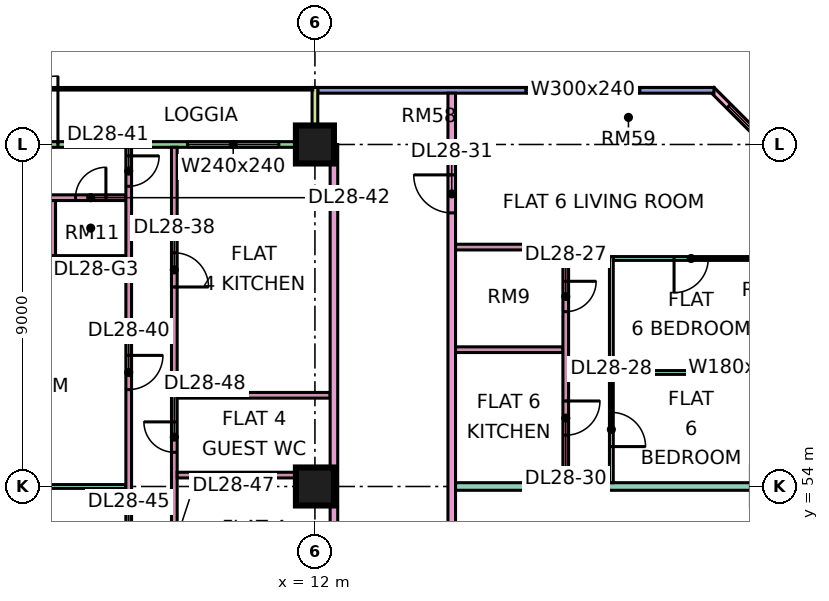
"""IFC4 building model, lengths in metres.
Left out: names, types, materials, properties, quantities, classifications, styles, units other than length and angle.
Written with IfcOpenShell. Run it as: python <this file> out.ifc"""

import sys

from ifc_helpers import new_model, si_unit, direction, frame, frame_2d, origin, origin_2d, place, context, subcontext, project, spatial, rectangle, extrude, element, fill, save


model = new_model("IFC4")
c1 = context("Model", 3, precision=1e-05, world=origin(), true_north=direction((0.0, 1.0)))
c2 = subcontext(c1, "Body", "Model", "MODEL_VIEW")
j1 = project(units=[si_unit("LENGTHUNIT", "METRE"), si_unit("PLANEANGLEUNIT", "RADIAN")], contexts=[c1])
p1 = place(None, origin())
s1 = spatial("IfcSite", under=j1, at=p1, CompositionType="ELEMENT")
p2 = place(p1, origin())
s2 = spatial("IfcBuilding", under=s1, at=p2, CompositionType="ELEMENT")
p3 = place(p2, frame((0.0, 0.0, 121.9)))
s3 = spatial("IfcBuildingStorey", under=s2, at=p3, CompositionType="ELEMENT", Elevation=121.9)
for number, where, z_axis, x_axis in (
    (1, (12.0, 54.0, 0.0), (0.0, 0.0, 1.0), (1.0, 0.0, 0.0)),
    (2, (12.0, 63.0, 0.0), (0.0, 0.0, 1.0), (1.0, 0.0, 0.0)),
):
    element("IfcColumn", number, at=place(p3, frame(where, z_axis=z_axis, x_axis=x_axis)), inside=s3, PredefinedType="COLUMN", context=c2, shape_type="SweptSolid", body=[
        extrude(rectangle(XDim=1.0, YDim=1.0, at=origin_2d()), origin(), (0.0, 0.0, 1.0), 3.75),
    ])
p4 = place(p3, frame((25.447, 61.447, 0.0), z_axis=(0.0, 0.0, 1.0), x_axis=(-0.707106781187, 0.707106781187, 0.0)))
e3 = element("IfcWall", 3, at=p4, inside=s3, PredefinedType="SOLIDWALL", context=c2, shape_type="SweptSolid", body=[
    extrude(rectangle(XDim=4.243, YDim=0.15, at=frame_2d((2.121, 0.0))), origin(), (0.0, 0.0, 1.0), 3.35),
])
p5 = place(p4, frame((0.621, 0.0, 0.45)))
e4 = element("IfcOpeningElement", 4, at=p5, cuts=e3, PredefinedType="OPENING", context=c2, shape_type="SweptSolid", body=[
    extrude(rectangle(XDim=3.0, YDim=2.4, at=frame_2d((1.5, 1.2))), frame((0.0, 0.085, 0.0), z_axis=(0.0, -1.0, 0.0), x_axis=(1.0, 0.0, 0.0)), (0.0, 0.0, 1.0), 0.17),
])
p6 = place(p3, frame((22.5, 64.425, 0.0), z_axis=(0.0, 0.0, 1.0), x_axis=(-1.0, 0.0, 0.0)))
e5 = element("IfcWall", 5, at=p6, inside=s3, PredefinedType="SOLIDWALL", context=c2, shape_type="SweptSolid", body=[
    extrude(rectangle(XDim=10.425, YDim=0.15, at=frame_2d((5.212, 0.0))), origin(), (0.0, 0.0, 1.0), 3.35),
])
p7 = place(p6, frame((1.95, 0.0, 0.45)))
e6 = element("IfcOpeningElement", 6, at=p7, cuts=e5, PredefinedType="OPENING", context=c2, shape_type="SweptSolid", body=[
    extrude(rectangle(XDim=3.0, YDim=2.4, at=frame_2d((1.5, 1.2))), frame((0.0, 0.085, 0.0), z_axis=(0.0, -1.0, 0.0), x_axis=(1.0, 0.0, 0.0)), (0.0, 0.0, 1.0), 0.17),
])
p8 = place(p3, frame((11.925, 63.0, 0.0), z_axis=(0.0, 0.0, 1.0), x_axis=(-1.0, 0.0, 0.0)))
e7 = element("IfcWall", 7, at=p8, inside=s3, PredefinedType="SOLIDWALL", context=c2, shape_type="SweptSolid", body=[
    extrude(rectangle(XDim=10.35, YDim=0.15, at=frame_2d((5.175, 0.0))), origin(), (0.0, 0.0, 1.0), 3.35),
])
p9 = place(p8, frame((0.875, 0.0, 0.45)))
e8 = element("IfcOpeningElement", 8, at=p9, cuts=e7, PredefinedType="OPENING", context=c2, shape_type="SweptSolid", body=[
    extrude(rectangle(XDim=2.4, YDim=2.4, at=frame_2d((1.2, 1.2))), frame((0.0, 0.085, 0.0), z_axis=(0.0, -1.0, 0.0), x_axis=(1.0, 0.0, 0.0)), (0.0, 0.0, 1.0), 0.17),
])
p10 = place(p8, frame((6.688, 0.0, 0.0)))
e9 = element("IfcOpeningElement", 9, at=p10, cuts=e7, PredefinedType="OPENING", context=c2, shape_type="SweptSolid", body=[
    extrude(rectangle(XDim=1.8, YDim=2.4, at=frame_2d((0.9, 1.2))), frame((0.0, 0.085, 0.0), z_axis=(0.0, -1.0, 0.0), x_axis=(1.0, 0.0, 0.0)), (0.0, 0.0, 1.0), 0.17),
])
p11 = place(p3, frame((12.0, 64.5, 0.0), z_axis=(0.0, 0.0, 1.0), x_axis=(0.0, -1.0, 0.0)))
e10 = element("IfcWall", 10, at=p11, inside=s3, PredefinedType="SOLIDWALL", context=c2, shape_type="SweptSolid", body=[
    extrude(rectangle(XDim=1.5, YDim=0.15, at=frame_2d((0.75, 0.0))), origin(), (0.0, 0.0, 1.0), 3.35),
])
p12 = place(p3, frame((0.074, 54.0, 0.0), z_axis=(0.0, 0.0, 1.0), x_axis=(1.0, 0.0, 0.0)))
e11 = element("IfcWall", 11, at=p12, inside=s3, PredefinedType="PARTITIONING", context=c2, shape_type="SweptSolid", body=[
    extrude(rectangle(XDim=6.951, YDim=0.1, at=frame_2d((3.476, 0.0))), origin(), (0.0, 0.0, 1.0), 3.35),
])
p13 = place(p3, frame((0.074, 60.0, 0.0), z_axis=(0.0, 0.0, 1.0), x_axis=(1.0, 0.0, 0.0)))
e12 = element("IfcWall", 12, at=p13, inside=s3, PredefinedType="PARTITIONING", context=c2, shape_type="SweptSolid", body=[
    extrude(rectangle(XDim=6.951, YDim=0.15, at=frame_2d((3.476, 0.0))), origin(), (0.0, 0.0, 1.0), 3.35),
])
p14 = place(p3, frame((5.025, 61.6, 0.0), z_axis=(0.0, 0.0, 1.0), x_axis=(1.0, 0.0, 0.0)))
e13 = element("IfcWall", 13, at=p14, inside=s3, PredefinedType="PARTITIONING", context=c2, shape_type="SweptSolid", body=[
    extrude(rectangle(XDim=2.0, YDim=0.15, at=frame_2d((1.0, 0.0))), origin(), (0.0, 0.0, 1.0), 3.35),
])
p15 = place(p14, frame((0.675, 0.0, 0.0)))
e14 = element("IfcOpeningElement", 14, at=p15, cuts=e13, PredefinedType="OPENING", context=c2, shape_type="SweptSolid", body=[
    extrude(rectangle(XDim=0.8, YDim=2.1, at=frame_2d((0.4, 1.05))), frame((0.0, 0.085, 0.0), z_axis=(0.0, -1.0, 0.0), x_axis=(1.0, 0.0, 0.0)), (0.0, 0.0, 1.0), 0.17),
])
p16 = place(p3, frame((5.1, 60.075, 0.0), z_axis=(0.0, 0.0, 1.0), x_axis=(0.0, 1.0, 0.0)))
e15 = element("IfcWall", 15, at=p16, inside=s3, PredefinedType="PARTITIONING", context=c2, shape_type="SweptSolid", body=[
    extrude(rectangle(XDim=1.45, YDim=0.15, at=frame_2d((0.725, 0.0))), origin(), (0.0, 0.0, 1.0), 3.35),
])
p17 = place(p3, frame((7.1, 36.1, 0.0), z_axis=(0.0, 0.0, 1.0), x_axis=(0.0, 1.0, 0.0)))
e16 = element("IfcWall", 16, at=p17, inside=s3, PredefinedType="PARTITIONING", context=c2, shape_type="SweptSolid", body=[
    extrude(rectangle(XDim=26.826, YDim=0.15, at=frame_2d((13.413, 0.0))), origin(), (0.0, 0.0, 1.0), 3.35),
])
p18 = place(p17, frame((0.95, 0.0, 0.0)))
e17 = element("IfcOpeningElement", 17, at=p18, cuts=e16, PredefinedType="OPENING", context=c2, shape_type="SweptSolid", body=[
    extrude(rectangle(XDim=0.9, YDim=2.1, at=frame_2d((0.45, 1.05))), frame((0.0, 0.085, 0.0), z_axis=(0.0, -1.0, 0.0), x_axis=(1.0, 0.0, 0.0)), (0.0, 0.0, 1.0), 0.17),
])
p19 = place(p17, frame((9.95, 0.0, 0.0)))
e18 = element("IfcOpeningElement", 18, at=p19, cuts=e16, PredefinedType="OPENING", context=c2, shape_type="SweptSolid", body=[
    extrude(rectangle(XDim=0.9, YDim=2.1, at=frame_2d((0.45, 1.05))), frame((0.0, 0.085, 0.0), z_axis=(0.0, -1.0, 0.0), x_axis=(1.0, 0.0, 0.0)), (0.0, 0.0, 1.0), 0.17),
])
p20 = place(p17, frame((6.95, 0.0, 0.0)))
e19 = element("IfcOpeningElement", 19, at=p20, cuts=e16, PredefinedType="OPENING", context=c2, shape_type="SweptSolid", body=[
    extrude(rectangle(XDim=0.9, YDim=2.1, at=frame_2d((0.45, 1.05))), frame((0.0, 0.085, 0.0), z_axis=(0.0, -1.0, 0.0), x_axis=(1.0, 0.0, 0.0)), (0.0, 0.0, 1.0), 0.17),
])
p21 = place(p17, frame((20.45, 0.0, 0.0)))
e20 = element("IfcOpeningElement", 20, at=p21, cuts=e16, PredefinedType="OPENING", context=c2, shape_type="SweptSolid", body=[
    extrude(rectangle(XDim=0.9, YDim=2.1, at=frame_2d((0.45, 1.05))), frame((0.0, 0.085, 0.0), z_axis=(0.0, -1.0, 0.0), x_axis=(1.0, 0.0, 0.0)), (0.0, 0.0, 1.0), 0.17),
])
p22 = place(p17, frame((25.8, 0.0, 0.0)))
e21 = element("IfcOpeningElement", 21, at=p22, cuts=e16, PredefinedType="OPENING", context=c2, shape_type="SweptSolid", body=[
    extrude(rectangle(XDim=0.8, YDim=2.1, at=frame_2d((0.4, 1.05))), frame((0.0, 0.085, 0.0), z_axis=(0.0, -1.0, 0.0), x_axis=(1.0, 0.0, 0.0)), (0.0, 0.0, 1.0), 0.17),
])
p23 = place(p17, frame((12.55, 0.0, 0.0)))
e22 = element("IfcOpeningElement", 22, at=p23, cuts=e16, PredefinedType="OPENING", context=c2, shape_type="SweptSolid", body=[
    extrude(rectangle(XDim=1.6, YDim=2.1, at=frame_2d((0.8, 1.05))), frame((0.0, 0.085, 0.0), z_axis=(0.0, -1.0, 0.0), x_axis=(1.0, 0.0, 0.0)), (0.0, 0.0, 1.0), 0.17),
])
p24 = place(p17, frame((15.95, 0.0, 0.0)))
e23 = element("IfcOpeningElement", 23, at=p24, cuts=e16, PredefinedType="OPENING", context=c2, shape_type="SweptSolid", body=[
    extrude(rectangle(XDim=0.9, YDim=2.1, at=frame_2d((0.45, 1.05))), frame((0.0, 0.085, 0.0), z_axis=(0.0, -1.0, 0.0), x_axis=(1.0, 0.0, 0.0)), (0.0, 0.0, 1.0), 0.17),
])
p25 = place(p3, frame((8.3, 41.625, 0.0), z_axis=(0.0, 0.0, 1.0), x_axis=(0.0, 1.0, 0.0)))
e24 = element("IfcWall", 24, at=p25, inside=s3, PredefinedType="PARTITIONING", context=c2, shape_type="SweptSolid", body=[
    extrude(rectangle(XDim=21.301, YDim=0.15, at=frame_2d((10.65, 0.0))), origin(), (0.0, 0.0, 1.0), 3.35),
])
p26 = place(p25, frame((4.725, 0.0, 0.0)))
e25 = element("IfcOpeningElement", 25, at=p26, cuts=e24, PredefinedType="OPENING", context=c2, shape_type="SweptSolid", body=[
    extrude(rectangle(XDim=0.8, YDim=2.1, at=frame_2d((0.4, 1.05))), frame((0.0, 0.085, 0.0), z_axis=(0.0, -1.0, 0.0), x_axis=(1.0, 0.0, 0.0)), (0.0, 0.0, 1.0), 0.17),
])
p27 = place(p25, frame((17.625, 0.0, 0.0)))
e26 = element("IfcOpeningElement", 26, at=p27, cuts=e24, PredefinedType="OPENING", context=c2, shape_type="SweptSolid", body=[
    extrude(rectangle(XDim=0.9, YDim=2.1, at=frame_2d((0.45, 1.05))), frame((0.0, 0.085, 0.0), z_axis=(0.0, -1.0, 0.0), x_axis=(1.0, 0.0, 0.0)), (0.0, 0.0, 1.0), 0.17),
])
p28 = place(p25, frame((1.275, 0.0, 0.0)))
e27 = element("IfcOpeningElement", 27, at=p28, cuts=e24, PredefinedType="OPENING", context=c2, shape_type="SweptSolid", body=[
    extrude(rectangle(XDim=0.8, YDim=2.1, at=frame_2d((0.4, 1.05))), frame((0.0, 0.085, 0.0), z_axis=(0.0, -1.0, 0.0), x_axis=(1.0, 0.0, 0.0)), (0.0, 0.0, 1.0), 0.17),
])
p29 = place(p25, frame((7.575, 0.0, 0.0)))
e28 = element("IfcOpeningElement", 28, at=p29, cuts=e24, PredefinedType="OPENING", context=c2, shape_type="SweptSolid", body=[
    extrude(rectangle(XDim=0.8, YDim=2.1, at=frame_2d((0.4, 1.05))), frame((0.0, 0.085, 0.0), z_axis=(0.0, -1.0, 0.0), x_axis=(1.0, 0.0, 0.0)), (0.0, 0.0, 1.0), 0.17),
])
p30 = place(p25, frame((10.425, 0.0, 0.0)))
e29 = element("IfcOpeningElement", 29, at=p30, cuts=e24, PredefinedType="OPENING", context=c2, shape_type="SweptSolid", body=[
    extrude(rectangle(XDim=0.8, YDim=2.1, at=frame_2d((0.4, 1.05))), frame((0.0, 0.085, 0.0), z_axis=(0.0, -1.0, 0.0), x_axis=(1.0, 0.0, 0.0)), (0.0, 0.0, 1.0), 0.17),
])
p31 = place(p25, frame((13.275, 0.0, 0.0)))
e30 = element("IfcOpeningElement", 30, at=p31, cuts=e24, PredefinedType="OPENING", context=c2, shape_type="SweptSolid", body=[
    extrude(rectangle(XDim=0.8, YDim=2.1, at=frame_2d((0.4, 1.05))), frame((0.0, 0.085, 0.0), z_axis=(0.0, -1.0, 0.0), x_axis=(1.0, 0.0, 0.0)), (0.0, 0.0, 1.0), 0.17),
])
for number, where, z_axis, x_axis in (
    (31, (8.375, 54.3, 0.0), (0.0, 0.0, 1.0), (1.0, 0.0, 0.0)),
    (32, (8.375, 56.4, 0.0), (0.0, 0.0, 1.0), (1.0, 0.0, 0.0)),
):
    element("IfcWall", number, at=place(p3, frame(where, z_axis=z_axis, x_axis=x_axis)), inside=s3, PredefinedType="PARTITIONING", context=c2, shape_type="SweptSolid", body=[
        extrude(rectangle(XDim=4.025, YDim=0.15, at=frame_2d((2.012, 0.0))), origin(), (0.0, 0.0, 1.0), 3.35),
    ])
p32 = place(p3, frame((12.5, 20.0, 0.0), z_axis=(0.0, 0.0, 1.0), x_axis=(0.0, 1.0, 0.0)))
e33 = element("IfcWall", 33, at=p32, inside=s3, PredefinedType="PARTITIONING", context=c2, shape_type="SweptSolid", body=[
    extrude(rectangle(XDim=43.0, YDim=0.2, at=frame_2d((21.5, 0.0))), origin(), (0.0, 0.0, 1.0), 3.35),
])
p33 = place(p32, frame((19.65, 0.0, 0.0)))
e34 = element("IfcOpeningElement", 34, at=p33, cuts=e33, PredefinedType="OPENING", context=c2, shape_type="SweptSolid", body=[
    extrude(rectangle(XDim=1.0, YDim=2.1, at=frame_2d((0.5, 1.05))), frame((0.0, 0.11, 0.0), z_axis=(0.0, -1.0, 0.0), x_axis=(1.0, 0.0, 0.0)), (0.0, 0.0, 1.0), 0.22),
])
p34 = place(p32, frame((0.6, 0.0, 0.0)))
e35 = element("IfcOpeningElement", 35, at=p34, cuts=e33, PredefinedType="OPENING", context=c2, shape_type="SweptSolid", body=[
    extrude(rectangle(XDim=1.2, YDim=2.1, at=frame_2d((0.6, 1.05))), frame((0.0, 0.11, 0.0), z_axis=(0.0, -1.0, 0.0), x_axis=(1.0, 0.0, 0.0)), (0.0, 0.0, 1.0), 0.22),
])
p35 = place(p32, frame((4.5, 0.0, 0.0)))
e36 = element("IfcOpeningElement", 36, at=p35, cuts=e33, PredefinedType="OPENING", context=c2, shape_type="SweptSolid", body=[
    extrude(rectangle(XDim=1.0, YDim=2.1, at=frame_2d((0.5, 1.05))), frame((0.0, 0.11, 0.0), z_axis=(0.0, -1.0, 0.0), x_axis=(1.0, 0.0, 0.0)), (0.0, 0.0, 1.0), 0.22),
])
p36 = place(p3, frame((15.6, 51.225, 0.0), z_axis=(0.0, 0.0, 1.0), x_axis=(0.0, 1.0, 0.0)))
e37 = element("IfcWall", 37, at=p36, inside=s3, PredefinedType="PARTITIONING", context=c2, shape_type="SweptSolid", body=[
    extrude(rectangle(XDim=13.125, YDim=0.2, at=frame_2d((6.562, 0.0))), origin(), (0.0, 0.0, 1.0), 3.35),
])
p37 = place(p36, frame((9.975, 0.0, 0.0)))
e38 = element("IfcOpeningElement", 38, at=p37, cuts=e37, PredefinedType="OPENING", context=c2, shape_type="SweptSolid", body=[
    extrude(rectangle(XDim=1.0, YDim=2.1, at=frame_2d((0.5, 1.05))), frame((0.0, 0.11, 0.0), z_axis=(0.0, -1.0, 0.0), x_axis=(1.0, 0.0, 0.0)), (0.0, 0.0, 1.0), 0.22),
])
p38 = place(p3, frame((15.7, 54.0, 0.0), z_axis=(0.0, 0.0, 1.0), x_axis=(1.0, 0.0, 0.0)))
e39 = element("IfcWall", 39, at=p38, inside=s3, PredefinedType="PARTITIONING", context=c2, shape_type="SweptSolid", body=[
    extrude(rectangle(XDim=8.226, YDim=0.2, at=frame_2d((4.113, 0.0))), origin(), (0.0, 0.0, 1.0), 3.35),
])
for number, where, z_axis, x_axis in (
    (40, (15.7, 57.6, 0.0), (0.0, 0.0, 1.0), (1.0, 0.0, 0.0)),
    (41, (15.7, 60.3, 0.0), (0.0, 0.0, 1.0), (1.0, 0.0, 0.0)),
):
    element("IfcWall", number, at=place(p3, frame(where, z_axis=z_axis, x_axis=x_axis)), inside=s3, PredefinedType="PARTITIONING", context=c2, shape_type="SweptSolid", body=[
        extrude(rectangle(XDim=2.825, YDim=0.15, at=frame_2d((1.413, 0.0))), origin(), (0.0, 0.0, 1.0), 3.35),
    ])
p39 = place(p3, frame((18.6, 54.1, 0.0), z_axis=(0.0, 0.0, 1.0), x_axis=(0.0, 1.0, 0.0)))
e42 = element("IfcWall", 42, at=p39, inside=s3, PredefinedType="PARTITIONING", context=c2, shape_type="SweptSolid", body=[
    extrude(rectangle(XDim=6.275, YDim=0.15, at=frame_2d((3.137, 0.0))), origin(), (0.0, 0.0, 1.0), 3.35),
])
p40 = place(p39, frame((4.5, 0.0, 0.0)))
e43 = element("IfcOpeningElement", 43, at=p40, cuts=e42, PredefinedType="OPENING", context=c2, shape_type="SweptSolid", body=[
    extrude(rectangle(XDim=0.8, YDim=2.1, at=frame_2d((0.4, 1.05))), frame((0.0, 0.085, 0.0), z_axis=(0.0, -1.0, 0.0), x_axis=(1.0, 0.0, 0.0)), (0.0, 0.0, 1.0), 0.17),
])
p41 = place(p39, frame((1.25, 0.0, 0.0)))
e44 = element("IfcOpeningElement", 44, at=p41, cuts=e42, PredefinedType="OPENING", context=c2, shape_type="SweptSolid", body=[
    extrude(rectangle(XDim=0.9, YDim=2.1, at=frame_2d((0.45, 1.05))), frame((0.0, 0.085, 0.0), z_axis=(0.0, -1.0, 0.0), x_axis=(1.0, 0.0, 0.0)), (0.0, 0.0, 1.0), 0.17),
])
p42 = place(p3, frame((19.8, 54.1, 0.0), z_axis=(0.0, 0.0, 1.0), x_axis=(0.0, 1.0, 0.0)))
e45 = element("IfcWall", 45, at=p42, inside=s3, PredefinedType="PARTITIONING", context=c2, shape_type="SweptSolid", body=[
    extrude(rectangle(XDim=5.95, YDim=0.1, at=frame_2d((2.975, 0.0))), origin(), (0.0, 0.0, 1.0), 3.35),
])
p43 = place(p42, frame((0.95, 0.0, 0.0)))
e46 = element("IfcOpeningElement", 46, at=p43, cuts=e45, PredefinedType="OPENING", context=c2, shape_type="SweptSolid", body=[
    extrude(rectangle(XDim=0.9, YDim=2.1, at=frame_2d((0.45, 1.05))), frame((0.0, 0.06, 0.0), z_axis=(0.0, -1.0, 0.0), x_axis=(1.0, 0.0, 0.0)), (0.0, 0.0, 1.0), 0.12),
])
p44 = place(p3, frame((19.85, 57.0, 0.0), z_axis=(0.0, 0.0, 1.0), x_axis=(1.0, 0.0, 0.0)))
e47 = element("IfcWall", 47, at=p44, inside=s3, PredefinedType="PARTITIONING", context=c2, shape_type="SweptSolid", body=[
    extrude(rectangle(XDim=4.076, YDim=0.1, at=frame_2d((2.038, 0.0))), origin(), (0.0, 0.0, 1.0), 3.35),
])
p45 = place(p3, frame((19.85, 60.0, 0.0), z_axis=(0.0, 0.0, 1.0), x_axis=(1.0, 0.0, 0.0)))
e48 = element("IfcWall", 48, at=p45, inside=s3, PredefinedType="PARTITIONING", context=c2, shape_type="SweptSolid", body=[
    extrude(rectangle(XDim=4.076, YDim=0.1, at=frame_2d((2.038, 0.0))), origin(), (0.0, 0.0, 1.0), 3.35),
])
p46 = place(p45, frame((1.6, 0.0, 0.0)))
e49 = element("IfcOpeningElement", 49, at=p46, cuts=e48, PredefinedType="OPENING", context=c2, shape_type="SweptSolid", body=[
    extrude(rectangle(XDim=0.9, YDim=2.1, at=frame_2d((0.45, 1.05))), frame((0.0, 0.06, 0.0), z_axis=(0.0, -1.0, 0.0), x_axis=(1.0, 0.0, 0.0)), (0.0, 0.0, 1.0), 0.12),
])
p47 = place(p5, origin())
e50 = element("IfcWindow", 50, at=p47, inside=s3, PartitioningType="SINGLE_PANEL", PredefinedType="WINDOW", context=c2, shape_type="SweptSolid", body=[
    extrude(rectangle(XDim=3.0, YDim=2.4, at=frame_2d((1.5, 1.2))), frame((0.0, 0.03, 0.0), z_axis=(0.0, -1.0, 0.0), x_axis=(1.0, 0.0, 0.0)), (0.0, 0.0, 1.0), 0.06),
])
fill(e4, e50)
p48 = place(p7, origin())
e51 = element("IfcWindow", 51, at=p48, inside=s3, PartitioningType="SINGLE_PANEL", PredefinedType="WINDOW", context=c2, shape_type="SweptSolid", body=[
    extrude(rectangle(XDim=3.0, YDim=2.4, at=frame_2d((1.5, 1.2))), frame((0.0, 0.03, 0.0), z_axis=(0.0, -1.0, 0.0), x_axis=(1.0, 0.0, 0.0)), (0.0, 0.0, 1.0), 0.06),
])
fill(e6, e51)
p49 = place(p9, origin())
e52 = element("IfcWindow", 52, at=p49, inside=s3, PartitioningType="SINGLE_PANEL", PredefinedType="WINDOW", context=c2, shape_type="SweptSolid", body=[
    extrude(rectangle(XDim=2.4, YDim=2.4, at=frame_2d((1.2, 1.2))), frame((0.0, 0.03, 0.0), z_axis=(0.0, -1.0, 0.0), x_axis=(1.0, 0.0, 0.0)), (0.0, 0.0, 1.0), 0.06),
])
fill(e8, e52)
p50 = place(p10, frame((1.8, 0.0, 0.0), z_axis=(0.0, 0.0, 1.0), x_axis=(-1.0, 0.0, 0.0)))
e53 = element("IfcDoor", 53, at=p50, inside=s3, OperationType="DOUBLE_DOOR_SINGLE_SWING", PredefinedType="DOOR", context=c2, shape_type="SweptSolid", body=[
    extrude(rectangle(XDim=1.8, YDim=2.4, at=frame_2d((0.9, 1.2))), frame((0.0, 0.025, 0.0), z_axis=(0.0, -1.0, 0.0), x_axis=(1.0, 0.0, 0.0)), (0.0, 0.0, 1.0), 0.05),
])
fill(e9, e53)
p51 = place(p40, origin())
e54 = element("IfcDoor", 54, at=p51, inside=s3, OperationType="SINGLE_SWING_RIGHT", PredefinedType="DOOR", context=c2, shape_type="SweptSolid", body=[
    extrude(rectangle(XDim=0.8, YDim=2.1, at=frame_2d((0.4, 1.05))), frame((0.0, 0.025, 0.0), z_axis=(0.0, -1.0, 0.0), x_axis=(1.0, 0.0, 0.0)), (0.0, 0.0, 1.0), 0.05),
])
fill(e43, e54)
p52 = place(p43, frame((0.9, 0.0, 0.0), z_axis=(0.0, 0.0, 1.0), x_axis=(-1.0, 0.0, 0.0)))
e55 = element("IfcDoor", 55, at=p52, inside=s3, OperationType="SINGLE_SWING_LEFT", PredefinedType="DOOR", context=c2, shape_type="SweptSolid", body=[
    extrude(rectangle(XDim=0.9, YDim=2.1, at=frame_2d((0.45, 1.05))), frame((0.0, 0.025, 0.0), z_axis=(0.0, -1.0, 0.0), x_axis=(1.0, 0.0, 0.0)), (0.0, 0.0, 1.0), 0.05),
])
fill(e46, e55)
p53 = place(p46, frame((0.9, 0.0, 0.0), z_axis=(0.0, 0.0, 1.0), x_axis=(-1.0, 0.0, 0.0)))
e56 = element("IfcDoor", 56, at=p53, inside=s3, OperationType="SINGLE_SWING_LEFT", PredefinedType="DOOR", context=c2, shape_type="SweptSolid", body=[
    extrude(rectangle(XDim=0.9, YDim=2.1, at=frame_2d((0.45, 1.05))), frame((0.0, 0.025, 0.0), z_axis=(0.0, -1.0, 0.0), x_axis=(1.0, 0.0, 0.0)), (0.0, 0.0, 1.0), 0.05),
])
fill(e49, e56)
p54 = place(p41, origin())
e57 = element("IfcDoor", 57, at=p54, inside=s3, OperationType="SINGLE_SWING_RIGHT", PredefinedType="DOOR", context=c2, shape_type="SweptSolid", body=[
    extrude(rectangle(XDim=0.9, YDim=2.1, at=frame_2d((0.45, 1.05))), frame((0.0, 0.025, 0.0), z_axis=(0.0, -1.0, 0.0), x_axis=(1.0, 0.0, 0.0)), (0.0, 0.0, 1.0), 0.05),
])
fill(e44, e57)
p55 = place(p37, frame((1.0, 0.0, 0.0), z_axis=(0.0, 0.0, 1.0), x_axis=(-1.0, 0.0, 0.0)))
e58 = element("IfcDoor", 58, at=p55, inside=s3, OperationType="SINGLE_SWING_RIGHT", PredefinedType="DOOR", context=c2, shape_type="SweptSolid", body=[
    extrude(rectangle(XDim=1.0, YDim=2.1, at=frame_2d((0.5, 1.05))), frame((0.0, 0.025, 0.0), z_axis=(0.0, -1.0, 0.0), x_axis=(1.0, 0.0, 0.0)), (0.0, 0.0, 1.0), 0.05),
])
fill(e38, e58)
p56 = place(p27, frame((0.9, 0.0, 0.0), z_axis=(0.0, 0.0, 1.0), x_axis=(-1.0, 0.0, 0.0)))
e59 = element("IfcDoor", 59, at=p56, inside=s3, OperationType="SINGLE_SWING_LEFT", PredefinedType="DOOR", context=c2, shape_type="SweptSolid", body=[
    extrude(rectangle(XDim=0.9, YDim=2.1, at=frame_2d((0.45, 1.05))), frame((0.0, 0.025, 0.0), z_axis=(0.0, -1.0, 0.0), x_axis=(1.0, 0.0, 0.0)), (0.0, 0.0, 1.0), 0.05),
])
fill(e26, e59)
p57 = place(p21, origin())
e60 = element("IfcDoor", 60, at=p57, inside=s3, OperationType="SINGLE_SWING_RIGHT", PredefinedType="DOOR", context=c2, shape_type="SweptSolid", body=[
    extrude(rectangle(XDim=0.9, YDim=2.1, at=frame_2d((0.45, 1.05))), frame((0.0, 0.025, 0.0), z_axis=(0.0, -1.0, 0.0), x_axis=(1.0, 0.0, 0.0)), (0.0, 0.0, 1.0), 0.05),
])
fill(e20, e60)
p58 = place(p22, origin())
e61 = element("IfcDoor", 61, at=p58, inside=s3, OperationType="SINGLE_SWING_RIGHT", PredefinedType="DOOR", context=c2, shape_type="SweptSolid", body=[
    extrude(rectangle(XDim=0.8, YDim=2.1, at=frame_2d((0.4, 1.05))), frame((0.0, 0.025, 0.0), z_axis=(0.0, -1.0, 0.0), x_axis=(1.0, 0.0, 0.0)), (0.0, 0.0, 1.0), 0.05),
])
fill(e21, e61)
p59 = place(p15, frame((0.8, 0.0, 0.0), z_axis=(0.0, 0.0, 1.0), x_axis=(-1.0, 0.0, 0.0)))
e62 = element("IfcDoor", 62, at=p59, inside=s3, OperationType="SINGLE_SWING_RIGHT", PredefinedType="DOOR", context=c2, shape_type="SweptSolid", body=[
    extrude(rectangle(XDim=0.8, YDim=2.1, at=frame_2d((0.4, 1.05))), frame((0.0, 0.025, 0.0), z_axis=(0.0, -1.0, 0.0), x_axis=(1.0, 0.0, 0.0)), (0.0, 0.0, 1.0), 0.05),
])
fill(e14, e62)
p60 = place(p31, frame((0.8, 0.0, 0.0), z_axis=(0.0, 0.0, 1.0), x_axis=(-1.0, 0.0, 0.0)))
e63 = element("IfcDoor", 63, at=p60, inside=s3, OperationType="SINGLE_SWING_RIGHT", PredefinedType="DOOR", context=c2, shape_type="SweptSolid", body=[
    extrude(rectangle(XDim=0.8, YDim=2.1, at=frame_2d((0.4, 1.05))), frame((0.0, 0.025, 0.0), z_axis=(0.0, -1.0, 0.0), x_axis=(1.0, 0.0, 0.0)), (0.0, 0.0, 1.0), 0.05),
])
fill(e30, e63)
save(model, sys.argv[1])
